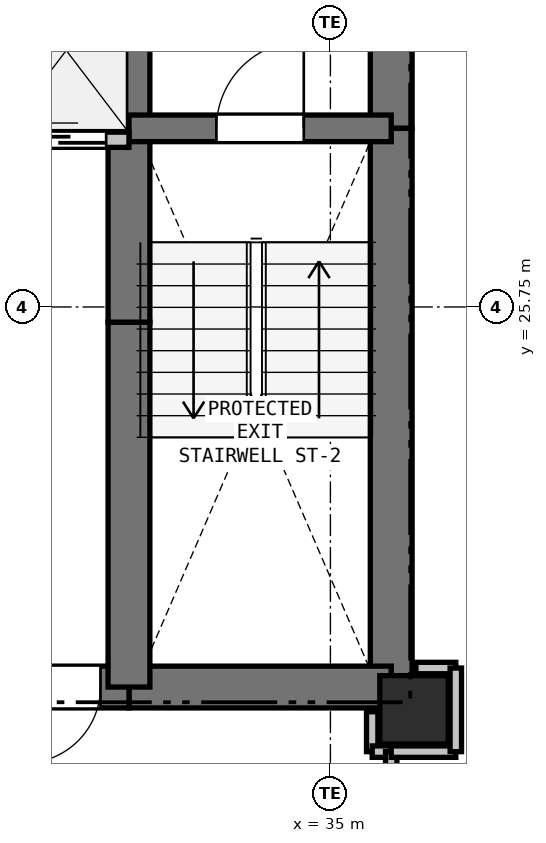
"""IFC4 building model, lengths in metres.
Left out: names, types, materials, properties, quantities, classifications, styles, units other than length and angle.
Written with IfcOpenShell. Run it as: python <this file> out.ifc"""

import sys

from ifc_helpers import new_model, si_unit, direction, frame, frame_2d, origin, origin_2d, place, context, subcontext, project, spatial, rectangle, extrude, element, fill, save


model = new_model("IFC4")
c1 = context("Model", 3, precision=1e-05, world=origin(), true_north=direction((0.0, 1.0)))
c2 = subcontext(c1, "Body", "Model", "MODEL_VIEW")
j1 = project(units=[si_unit("LENGTHUNIT", "METRE"), si_unit("PLANEANGLEUNIT", "RADIAN")], contexts=[c1])
p1 = place(None, origin())
s1 = spatial("IfcSite", under=j1, at=p1, CompositionType="ELEMENT")
p2 = place(p1, origin())
s2 = spatial("IfcBuilding", under=s1, at=p2, CompositionType="ELEMENT")
p3 = place(p2, frame((0.0, 0.0, 22.5)))
s3 = spatial("IfcBuildingStorey", under=s2, at=p3, CompositionType="ELEMENT", Elevation=22.5)
p4 = place(p3, frame((36.1, 20.45, 0.0), z_axis=(0.0, 0.0, 1.0), x_axis=(1.0, 0.0, 0.0)))
e1 = element("IfcColumn", 1, at=p4, inside=s3, PredefinedType="COLUMN", context=c2, shape_type="SweptSolid", body=[
    extrude(rectangle(XDim=0.9, YDim=0.9, at=origin_2d()), origin(), (0.0, 0.0, 1.0), 3.3),
])
p5 = place(p3, frame((35.8, 32.75, 0.0), z_axis=(0.0, 0.0, 1.0), x_axis=(0.0, -1.0, 0.0)))
e2 = element("IfcWall", 2, at=p5, inside=s3, PredefinedType="SHEAR", context=c2, shape_type="SweptSolid", body=[
    extrude(rectangle(XDim=4.65, YDim=0.55, at=frame_2d((2.325, 0.0))), origin(), (0.0, 0.0, 1.0), 3.04),
])
p6 = place(p3, frame((35.8, 28.1, 0.0), z_axis=(0.0, 0.0, 1.0), x_axis=(0.0, -1.0, 0.0)))
e3 = element("IfcWall", 3, at=p6, inside=s3, PredefinedType="SHEAR", context=c2, shape_type="SweptSolid", body=[
    extrude(rectangle(XDim=7.35, YDim=0.55, at=frame_2d((3.675, 0.0))), origin(), (0.0, 0.0, 1.0), 3.04),
])
p7 = place(p3, frame((35.8, 20.75, 0.0), z_axis=(0.0, 0.0, 1.0), x_axis=(-1.0, 0.0, 0.0)))
e4 = element("IfcWall", 4, at=p7, inside=s3, PredefinedType="SHEAR", context=c2, shape_type="SweptSolid", body=[
    extrude(rectangle(XDim=3.45, YDim=0.55, at=frame_2d((1.725, 0.0))), origin(), (0.0, 0.0, 1.0), 3.04),
])
p8 = place(p3, frame((32.35, 20.75, 0.0), z_axis=(0.0, 0.0, 1.0), x_axis=(-1.0, 0.0, 0.0)))
e5 = element("IfcWall", 5, at=p8, inside=s3, PredefinedType="SHEAR", context=c2, shape_type="SweptSolid", body=[
    extrude(rectangle(XDim=1.75, YDim=0.55, at=frame_2d((0.875, 0.0))), origin(), (0.0, 0.0, 1.0), 3.04),
])
p9 = place(p8, frame((0.375, 0.0, 0.0)))
e6 = element("IfcOpeningElement", 6, at=p9, cuts=e5, PredefinedType="OPENING", context=c2, shape_type="SweptSolid", body=[
    extrude(rectangle(XDim=1.0, YDim=2.15, at=frame_2d((0.5, 1.075))), frame((0.0, 0.285, 0.0), z_axis=(0.0, -1.0, 0.0), x_axis=(1.0, 0.0, 0.0)), (0.0, 0.0, 1.0), 0.57),
])
p10 = place(p3, frame((32.35, 20.75, 0.0), z_axis=(0.0, 0.0, 1.0), x_axis=(0.0, 1.0, 0.0)))
e7 = element("IfcWall", 7, at=p10, inside=s3, PredefinedType="SHEAR", context=c2, shape_type="SweptSolid", body=[
    extrude(rectangle(XDim=4.8, YDim=0.55, at=frame_2d((2.4, 0.0))), origin(), (0.0, 0.0, 1.0), 3.04),
])
p11 = place(p3, frame((32.35, 25.55, 0.0), z_axis=(0.0, 0.0, 1.0), x_axis=(0.0, 1.0, 0.0)))
e8 = element("IfcWall", 8, at=p11, inside=s3, PredefinedType="SHEAR", context=c2, shape_type="SweptSolid", body=[
    extrude(rectangle(XDim=2.4, YDim=0.55, at=frame_2d((1.2, 0.0))), origin(), (0.0, 0.0, 1.0), 3.04),
])
p12 = place(p3, frame((32.35, 27.95, 0.0), z_axis=(0.0, 0.0, 1.0), x_axis=(0.0, 1.0, 0.0)))
e9 = element("IfcWall", 9, at=p12, inside=s3, PredefinedType="SHEAR", context=c2, shape_type="SweptSolid", body=[
    extrude(rectangle(XDim=2.8, YDim=0.55, at=frame_2d((1.4, 0.0))), origin(), (0.0, 0.0, 1.0), 3.04),
])
p13 = place(p3, frame((32.35, 28.1, 0.0), z_axis=(0.0, 0.0, 1.0), x_axis=(1.0, 0.0, 0.0)))
e10 = element("IfcWall", 10, at=p13, inside=s3, PredefinedType="SHEAR", context=c2, shape_type="SweptSolid", body=[
    extrude(rectangle(XDim=3.45, YDim=0.35, at=frame_2d((1.725, 0.0))), origin(), (0.0, 0.0, 1.0), 3.04),
])
p14 = place(p13, frame((1.15, 0.0, 0.0)))
e11 = element("IfcOpeningElement", 11, at=p14, cuts=e10, PredefinedType="OPENING", context=c2, shape_type="SweptSolid", body=[
    extrude(rectangle(XDim=1.15, YDim=2.15, at=frame_2d((0.575, 1.075))), frame((0.0, 0.185, 0.0), z_axis=(0.0, -1.0, 0.0), x_axis=(1.0, 0.0, 0.0)), (0.0, 0.0, 1.0), 0.37),
])
p15 = place(p3, frame((27.4, 27.95, 0.0), z_axis=(0.0, 0.0, 1.0), x_axis=(1.0, 0.0, 0.0)))
e12 = element("IfcWall", 12, at=p15, inside=s3, PredefinedType="PARTITIONING", context=c2, shape_type="SweptSolid", body=[
    extrude(rectangle(XDim=4.95, YDim=0.2, at=frame_2d((2.475, 0.0))), origin(), (0.0, 0.0, 1.0), 3.04),
])
p16 = place(p15, frame((0.25, 0.0, 0.0)))
e13 = element("IfcOpeningElement", 13, at=p16, cuts=e12, PredefinedType="OPENING", context=c2, shape_type="SweptSolid", body=[
    extrude(rectangle(XDim=1.1, YDim=2.15, at=frame_2d((0.55, 1.075))), frame((0.0, 0.11, 0.0), z_axis=(0.0, -1.0, 0.0), x_axis=(1.0, 0.0, 0.0)), (0.0, 0.0, 1.0), 0.22),
])
p17 = place(p15, frame((1.9, 0.0, 0.0)))
e14 = element("IfcOpeningElement", 14, at=p17, cuts=e12, PredefinedType="OPENING", context=c2, shape_type="SweptSolid", body=[
    extrude(rectangle(XDim=1.1, YDim=2.15, at=frame_2d((0.55, 1.075))), frame((0.0, 0.11, 0.0), z_axis=(0.0, -1.0, 0.0), x_axis=(1.0, 0.0, 0.0)), (0.0, 0.0, 1.0), 0.22),
])
p18 = place(p15, frame((3.55, 0.0, 0.0)))
e15 = element("IfcOpeningElement", 15, at=p18, cuts=e12, PredefinedType="OPENING", context=c2, shape_type="SweptSolid", body=[
    extrude(rectangle(XDim=1.1, YDim=2.15, at=frame_2d((0.55, 1.075))), frame((0.0, 0.11, 0.0), z_axis=(0.0, -1.0, 0.0), x_axis=(1.0, 0.0, 0.0)), (0.0, 0.0, 1.0), 0.22),
])
p19 = place(p3, frame((35.55, 20.425, 0.0), z_axis=(0.0, 0.0, 1.0), x_axis=(0.0, -1.0, 0.0)))
e16 = element("IfcWall", 16, at=p19, inside=s3, PredefinedType="PARTITIONING", context=c2, shape_type="SweptSolid", body=[
    extrude(rectangle(XDim=0.525, YDim=0.15, at=frame_2d((0.263, 0.0))), origin(), (0.0, 0.0, 1.0), 2.488),
])
p20 = place(p3, frame((35.55, 19.9, 0.0), z_axis=(0.0, 0.0, 1.0), x_axis=(1.0, 0.0, 0.0)))
e17 = element("IfcWall", 17, at=p20, inside=s3, PredefinedType="PARTITIONING", context=c2, shape_type="SweptSolid", body=[
    extrude(rectangle(XDim=0.25, YDim=0.15, at=frame_2d((0.125, 0.0))), origin(), (0.0, 0.0, 1.0), 3.04),
])
p21 = place(p3, frame((35.8, 19.9, 0.0), z_axis=(0.0, 0.0, 1.0), x_axis=(0.0, -1.0, 0.0)))
e18 = element("IfcWall", 18, at=p21, inside=s3, PredefinedType="PARTITIONING", context=c2, shape_type="SweptSolid", body=[
    extrude(rectangle(XDim=1.75, YDim=0.15, at=frame_2d((0.875, 0.0))), origin(), (0.0, 0.0, 1.0), 3.04),
])
p22 = place(p21, frame((0.375, 0.0, 0.0)))
e19 = element("IfcOpeningElement", 19, at=p22, cuts=e18, PredefinedType="OPENING", context=c2, shape_type="SweptSolid", body=[
    extrude(rectangle(XDim=1.0, YDim=2.15, at=frame_2d((0.5, 1.075))), frame((0.0, 0.085, 0.0), z_axis=(0.0, -1.0, 0.0), x_axis=(1.0, 0.0, 0.0)), (0.0, 0.0, 1.0), 0.17),
])
p23 = place(p3, frame((36.65, 21.0, 0.0), z_axis=(0.0, 0.0, 1.0), x_axis=(-1.0, 0.0, 0.0)))
e20 = element("IfcWall", 20, at=p23, inside=s3, PredefinedType="PARTITIONING", context=c2, shape_type="SweptSolid", body=[
    extrude(rectangle(XDim=0.525, YDim=0.15, at=frame_2d((0.262, 0.0))), origin(), (0.0, 0.0, 1.0), 2.488),
])
p24 = place(p3, frame((35.8, 19.9, 0.0), z_axis=(0.0, 0.0, 1.0), x_axis=(1.0, 0.0, 0.0)))
e21 = element("IfcWall", 21, at=p24, inside=s3, PredefinedType="PARTITIONING", context=c2, shape_type="SweptSolid", body=[
    extrude(rectangle(XDim=0.85, YDim=0.15, at=frame_2d((0.425, 0.0))), origin(), (0.0, 0.0, 1.0), 2.337),
])
p25 = place(p3, frame((36.65, 19.9, 0.0), z_axis=(0.0, 0.0, 1.0), x_axis=(0.0, 1.0, 0.0)))
e22 = element("IfcWall", 22, at=p25, inside=s3, PredefinedType="PARTITIONING", context=c2, shape_type="SweptSolid", body=[
    extrude(rectangle(XDim=1.1, YDim=0.15, at=frame_2d((0.55, 0.0))), origin(), (0.0, 0.0, 1.0), 3.04),
])
p26 = place(p18, origin())
e23 = element("IfcDoor", 23, at=p26, inside=s3, OperationType="SLIDING_TO_LEFT", PredefinedType="DOOR", context=c2, shape_type="SweptSolid", body=[
    extrude(rectangle(XDim=1.1, YDim=2.15, at=frame_2d((0.55, 1.075))), frame((0.0, 0.025, 0.0), z_axis=(0.0, -1.0, 0.0), x_axis=(1.0, 0.0, 0.0)), (0.0, 0.0, 1.0), 0.05),
])
fill(e15, e23)
p27 = place(p9, origin())
e24 = element("IfcDoor", 24, at=p27, inside=s3, OperationType="SINGLE_SWING_RIGHT", PredefinedType="DOOR", context=c2, shape_type="SweptSolid", body=[
    extrude(rectangle(XDim=1.0, YDim=2.15, at=frame_2d((0.5, 1.075))), frame((0.0, 0.025, 0.0), z_axis=(0.0, -1.0, 0.0), x_axis=(1.0, 0.0, 0.0)), (0.0, 0.0, 1.0), 0.05),
])
fill(e6, e24)
p28 = place(p14, origin())
e25 = element("IfcDoor", 25, at=p28, inside=s3, OperationType="SINGLE_SWING_RIGHT", PredefinedType="DOOR", context=c2, shape_type="SweptSolid", body=[
    extrude(rectangle(XDim=1.15, YDim=2.15, at=frame_2d((0.575, 1.075))), frame((0.0, 0.025, 0.0), z_axis=(0.0, -1.0, 0.0), x_axis=(1.0, 0.0, 0.0)), (0.0, 0.0, 1.0), 0.05),
])
fill(e11, e25)
save(model, sys.argv[1])
